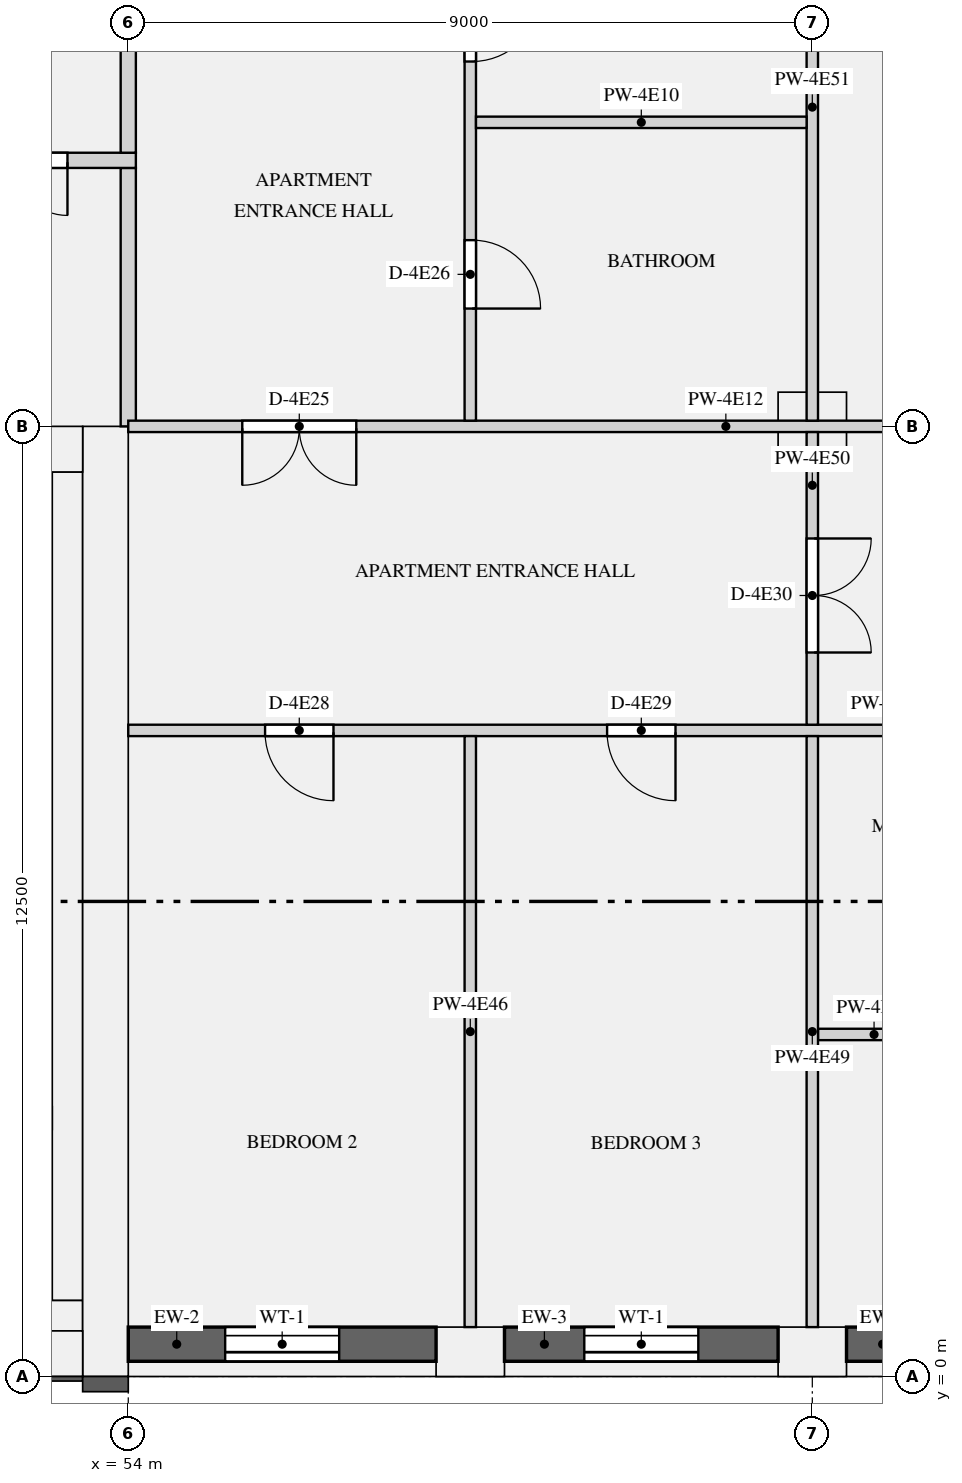
"""IFC4 building model, lengths in metres.
Left out: names, types, materials, properties, quantities, classifications, styles, units other than length and angle.
Written with IfcOpenShell. Run it as: python <this file> out.ifc"""

import sys

from ifc_helpers import new_model, si_unit, direction, frame, frame_2d, origin, origin_2d, place, context, subcontext, project, spatial, rectangle, extrude, element, fill, save


model = new_model("IFC4")
c1 = context("Model", 3, precision=1e-05, world=origin(), true_north=direction((0.0, 1.0)))
c2 = subcontext(c1, "Body", "Model", "MODEL_VIEW")
j1 = project(units=[si_unit("LENGTHUNIT", "METRE"), si_unit("PLANEANGLEUNIT", "RADIAN")], contexts=[c1])
p1 = place(None, origin())
s1 = spatial("IfcSite", under=j1, at=p1, CompositionType="ELEMENT")
p2 = place(p1, origin())
s2 = spatial("IfcBuilding", under=s1, at=p2, CompositionType="ELEMENT")
p3 = place(p2, frame((0.0, 0.0, 229.5)))
s3 = spatial("IfcBuildingStorey", under=s2, at=p3, CompositionType="ELEMENT", Elevation=229.5)
for number, where, z_axis, x_axis in (
    (1, (58.5, 0.325, 0.0), (0.0, 0.0, 1.0), (1.0, 0.0, 0.0)),
    (2, (63.0, 0.325, 0.0), (0.0, 0.0, 1.0), (1.0, 0.0, 0.0)),
):
    element("IfcColumn", number, at=place(p3, frame(where, z_axis=z_axis, x_axis=x_axis)), inside=s3, PredefinedType="USERDEFINED", context=c2, shape_type="SweptSolid", body=[
        extrude(rectangle(XDim=0.9, YDim=0.65, at=origin_2d()), origin(), (0.0, 0.0, 1.0), 3.15),
    ])
p4 = place(p3, frame((63.0, 12.5, 0.0), z_axis=(0.0, 0.0, 1.0), x_axis=(1.0, 0.0, 0.0)))
e3 = element("IfcColumn", 3, at=p4, inside=s3, PredefinedType="COLUMN", context=c2, shape_type="SweptSolid", body=[
    extrude(rectangle(XDim=0.9, YDim=0.9, at=origin_2d()), origin(), (0.0, 0.0, 1.0), 3.15),
])
p5 = place(p3, frame((53.7, 0.0, 0.0), z_axis=(0.0, 0.0, 1.0), x_axis=(0.0, 1.0, 0.0)))
e4 = element("IfcWall", 4, at=p5, inside=s3, PredefinedType="SHEAR", context=c2, shape_type="SweptSolid", body=[
    extrude(rectangle(XDim=12.5, YDim=0.6, at=frame_2d((6.25, 0.0))), origin(), (0.0, 0.0, 1.0), 3.15),
])
p6 = place(p3, frame((18.6, 0.3, 0.0), z_axis=(0.0, 0.0, 1.0), x_axis=(1.0, 0.0, 0.0)))
e5 = element("IfcWall", 5, at=p6, inside=s3, PredefinedType="SHEAR", context=c2, shape_type="SweptSolid", body=[
    extrude(rectangle(XDim=34.8, YDim=0.6, at=frame_2d((17.4, 0.0))), origin(), (0.0, 0.0, 1.0), 3.15),
])
p7 = place(p3, frame((18.6, 12.2, 0.0), z_axis=(0.0, 0.0, 1.0), x_axis=(1.0, 0.0, 0.0)))
e6 = element("IfcWall", 6, at=p7, inside=s3, PredefinedType="SHEAR", context=c2, shape_type="SweptSolid", body=[
    extrude(rectangle(XDim=34.8, YDim=0.6, at=frame_2d((17.4, 0.0))), origin(), (0.0, 0.0, 1.0), 3.15),
])
p8 = place(p7, frame((24.575, 0.0, 0.0)))
e7 = element("IfcOpeningElement", 7, at=p8, cuts=e6, PredefinedType="OPENING", context=c2, shape_type="SweptSolid", body=[
    extrude(rectangle(XDim=1.1, YDim=2.1, at=frame_2d((0.55, 1.05))), frame((0.0, 0.31, 0.0), z_axis=(0.0, -1.0, 0.0), x_axis=(1.0, 0.0, 0.0)), (0.0, 0.0, 1.0), 0.62),
])
p9 = place(p7, frame((26.825, 0.0, 0.0)))
e8 = element("IfcOpeningElement", 8, at=p9, cuts=e6, PredefinedType="OPENING", context=c2, shape_type="SweptSolid", body=[
    extrude(rectangle(XDim=1.1, YDim=2.1, at=frame_2d((0.55, 1.05))), frame((0.0, 0.31, 0.0), z_axis=(0.0, -1.0, 0.0), x_axis=(1.0, 0.0, 0.0)), (0.0, 0.0, 1.0), 0.62),
])
p10 = place(p7, frame((29.075, 0.0, 0.0)))
e9 = element("IfcOpeningElement", 9, at=p10, cuts=e6, PredefinedType="OPENING", context=c2, shape_type="SweptSolid", body=[
    extrude(rectangle(XDim=1.1, YDim=2.1, at=frame_2d((0.55, 1.05))), frame((0.0, 0.31, 0.0), z_axis=(0.0, -1.0, 0.0), x_axis=(1.0, 0.0, 0.0)), (0.0, 0.0, 1.0), 0.62),
])
p11 = place(p7, frame((4.95, 0.0, 0.0)))
e10 = element("IfcOpeningElement", 10, at=p11, cuts=e6, PredefinedType="OPENING", context=c2, shape_type="SweptSolid", body=[
    extrude(rectangle(XDim=0.9, YDim=2.1, at=frame_2d((0.45, 1.05))), frame((0.0, 0.31, 0.0), z_axis=(0.0, -1.0, 0.0), x_axis=(1.0, 0.0, 0.0)), (0.0, 0.0, 1.0), 0.62),
])
p12 = place(p7, frame((11.95, 0.0, 0.0)))
e11 = element("IfcOpeningElement", 11, at=p12, cuts=e6, PredefinedType="OPENING", context=c2, shape_type="SweptSolid", body=[
    extrude(rectangle(XDim=0.9, YDim=2.1, at=frame_2d((0.45, 1.05))), frame((0.0, 0.31, 0.0), z_axis=(0.0, -1.0, 0.0), x_axis=(1.0, 0.0, 0.0)), (0.0, 0.0, 1.0), 0.62),
])
p13 = place(p7, frame((18.45, 0.0, 0.0)))
e12 = element("IfcOpeningElement", 12, at=p13, cuts=e6, PredefinedType="OPENING", context=c2, shape_type="SweptSolid", body=[
    extrude(rectangle(XDim=0.9, YDim=2.1, at=frame_2d((0.45, 1.05))), frame((0.0, 0.31, 0.0), z_axis=(0.0, -1.0, 0.0), x_axis=(1.0, 0.0, 0.0)), (0.0, 0.0, 1.0), 0.62),
])
p14 = place(p7, frame((1.55, 0.0, 0.0)))
e13 = element("IfcOpeningElement", 13, at=p14, cuts=e6, PredefinedType="OPENING", context=c2, shape_type="SweptSolid", body=[
    extrude(rectangle(XDim=1.2, YDim=2.1, at=frame_2d((0.6, 1.05))), frame((0.0, 0.31, 0.0), z_axis=(0.0, -1.0, 0.0), x_axis=(1.0, 0.0, 0.0)), (0.0, 0.0, 1.0), 0.62),
])
p15 = place(p7, frame((32.05, 0.0, 0.0)))
e14 = element("IfcOpeningElement", 14, at=p15, cuts=e6, PredefinedType="OPENING", context=c2, shape_type="SweptSolid", body=[
    extrude(rectangle(XDim=1.2, YDim=2.1, at=frame_2d((0.6, 1.05))), frame((0.0, 0.31, 0.0), z_axis=(0.0, -1.0, 0.0), x_axis=(1.0, 0.0, 0.0)), (0.0, 0.0, 1.0), 0.62),
])
p16 = place(p3, frame((53.2, 1.0, 0.0), z_axis=(0.0, 0.0, 1.0), x_axis=(0.0, 1.0, 0.0)))
e15 = element("IfcWall", 15, at=p16, inside=s3, PredefinedType="SHEAR", context=c2, shape_type="SweptSolid", body=[
    extrude(rectangle(XDim=10.9, YDim=0.4, at=frame_2d((5.45, 0.0))), origin(), (0.0, 0.0, 1.0), 3.15),
])
p17 = place(p3, frame((18.6, 0.8, 0.0), z_axis=(0.0, 0.0, 1.0), x_axis=(1.0, 0.0, 0.0)))
e16 = element("IfcWall", 16, at=p17, inside=s3, PredefinedType="SHEAR", context=c2, shape_type="SweptSolid", body=[
    extrude(rectangle(XDim=34.8, YDim=0.4, at=frame_2d((17.4, 0.0))), origin(), (0.0, 0.0, 1.0), 3.15),
])
p18 = place(p3, frame((54.0, 0.425, 0.9), z_axis=(0.0, 0.0, 1.0), x_axis=(1.0, 0.0, 0.0)))
e17 = element("IfcWall", 17, at=p18, inside=s3, PredefinedType="SOLIDWALL", context=c2, shape_type="SweptSolid", body=[
    extrude(rectangle(XDim=4.05, YDim=0.45, at=frame_2d((2.025, 0.0))), origin(), (0.0, 0.0, 1.0), 1.93),
])
p19 = place(p18, frame((1.275, 0.0, 0.15)))
e18 = element("IfcOpeningElement", 18, at=p19, cuts=e17, PredefinedType="OPENING", context=c2, shape_type="SweptSolid", body=[
    extrude(rectangle(XDim=1.5, YDim=1.5, at=frame_2d((0.75, 0.75))), frame((0.0, 0.235, 0.0), z_axis=(0.0, -1.0, 0.0), x_axis=(1.0, 0.0, 0.0)), (0.0, 0.0, 1.0), 0.47),
])
p20 = place(p3, frame((58.95, 0.425, 0.9), z_axis=(0.0, 0.0, 1.0), x_axis=(1.0, 0.0, 0.0)))
e19 = element("IfcWall", 19, at=p20, inside=s3, PredefinedType="SOLIDWALL", context=c2, shape_type="SweptSolid", body=[
    extrude(rectangle(XDim=3.6, YDim=0.45, at=frame_2d((1.8, 0.0))), origin(), (0.0, 0.0, 1.0), 1.93),
])
p21 = place(p20, frame((1.05, 0.0, 0.15)))
e20 = element("IfcOpeningElement", 20, at=p21, cuts=e19, PredefinedType="OPENING", context=c2, shape_type="SweptSolid", body=[
    extrude(rectangle(XDim=1.5, YDim=1.5, at=frame_2d((0.75, 0.75))), frame((0.0, 0.235, 0.0), z_axis=(0.0, -1.0, 0.0), x_axis=(1.0, 0.0, 0.0)), (0.0, 0.0, 1.0), 0.47),
])
p22 = place(p3, frame((63.45, 0.425, 0.9), z_axis=(0.0, 0.0, 1.0), x_axis=(1.0, 0.0, 0.0)))
e21 = element("IfcWall", 21, at=p22, inside=s3, PredefinedType="SOLIDWALL", context=c2, shape_type="SweptSolid", body=[
    extrude(rectangle(XDim=3.4, YDim=0.45, at=frame_2d((1.7, 0.0))), origin(), (0.0, 0.0, 1.0), 1.93),
])
p23 = place(p22, frame((0.95, 0.0, 0.15)))
e22 = element("IfcOpeningElement", 22, at=p23, cuts=e21, PredefinedType="OPENING", context=c2, shape_type="SweptSolid", body=[
    extrude(rectangle(XDim=1.5, YDim=1.5, at=frame_2d((0.75, 0.75))), frame((0.0, 0.235, 0.0), z_axis=(0.0, -1.0, 0.0), x_axis=(1.0, 0.0, 0.0)), (0.0, 0.0, 1.0), 0.47),
])
p24 = place(p3, frame((54.0, 12.5, 0.0), z_axis=(0.0, 0.0, 1.0), x_axis=(0.0, 1.0, 0.0)))
e23 = element("IfcWall", 23, at=p24, inside=s3, PredefinedType="PARTITIONING", context=c2, shape_type="SweptSolid", body=[
    extrude(rectangle(XDim=3.4, YDim=0.2, at=frame_2d((1.7, 0.0))), origin(), (0.0, 0.0, 1.0), 2.83),
])
p25 = place(p3, frame((58.575, 16.5, 0.0), z_axis=(0.0, 0.0, 1.0), x_axis=(1.0, 0.0, 0.0)))
e24 = element("IfcWall", 24, at=p25, inside=s3, PredefinedType="PARTITIONING", context=c2, shape_type="SweptSolid", body=[
    extrude(rectangle(XDim=4.35, YDim=0.15, at=frame_2d((2.175, 0.0))), origin(), (0.0, 0.0, 1.0), 2.83),
])
p26 = place(p3, frame((54.0, 12.5, 0.0), z_axis=(0.0, 0.0, 1.0), x_axis=(1.0, 0.0, 0.0)))
e25 = element("IfcWall", 25, at=p26, inside=s3, PredefinedType="PARTITIONING", context=c2, shape_type="SweptSolid", body=[
    extrude(rectangle(XDim=17.35, YDim=0.15, at=frame_2d((8.675, 0.0))), origin(), (0.0, 0.0, 1.0), 2.83),
])
p27 = place(p26, frame((1.5, 0.0, 0.0)))
e26 = element("IfcOpeningElement", 26, at=p27, cuts=e25, PredefinedType="OPENING", context=c2, shape_type="SweptSolid", body=[
    extrude(rectangle(XDim=1.5, YDim=2.1, at=frame_2d((0.75, 1.05))), frame((0.0, 0.085, 0.0), z_axis=(0.0, -1.0, 0.0), x_axis=(1.0, 0.0, 0.0)), (0.0, 0.0, 1.0), 0.17),
])
p28 = place(p26, frame((12.725, 0.0, 0.0)))
e27 = element("IfcOpeningElement", 27, at=p28, cuts=e25, PredefinedType="OPENING", context=c2, shape_type="SweptSolid", body=[
    extrude(rectangle(XDim=1.5, YDim=2.1, at=frame_2d((0.75, 1.05))), frame((0.0, 0.085, 0.0), z_axis=(0.0, -1.0, 0.0), x_axis=(1.0, 0.0, 0.0)), (0.0, 0.0, 1.0), 0.17),
])
p29 = place(p3, frame((54.0, 8.5, 0.0), z_axis=(0.0, 0.0, 1.0), x_axis=(1.0, 0.0, 0.0)))
e28 = element("IfcWall", 28, at=p29, inside=s3, PredefinedType="PARTITIONING", context=c2, shape_type="SweptSolid", body=[
    extrude(rectangle(XDim=17.35, YDim=0.15, at=frame_2d((8.675, 0.0))), origin(), (0.0, 0.0, 1.0), 2.83),
])
p30 = place(p29, frame((1.8, 0.0, 0.0)))
e29 = element("IfcOpeningElement", 29, at=p30, cuts=e28, PredefinedType="OPENING", context=c2, shape_type="SweptSolid", body=[
    extrude(rectangle(XDim=0.9, YDim=2.1, at=frame_2d((0.45, 1.05))), frame((0.0, 0.085, 0.0), z_axis=(0.0, -1.0, 0.0), x_axis=(1.0, 0.0, 0.0)), (0.0, 0.0, 1.0), 0.17),
])
p31 = place(p29, frame((6.3, 0.0, 0.0)))
e30 = element("IfcOpeningElement", 30, at=p31, cuts=e28, PredefinedType="OPENING", context=c2, shape_type="SweptSolid", body=[
    extrude(rectangle(XDim=0.9, YDim=2.1, at=frame_2d((0.45, 1.05))), frame((0.0, 0.085, 0.0), z_axis=(0.0, -1.0, 0.0), x_axis=(1.0, 0.0, 0.0)), (0.0, 0.0, 1.0), 0.17),
])
p32 = place(p29, frame((12.8, 0.0, 0.0)))
e31 = element("IfcOpeningElement", 31, at=p32, cuts=e28, PredefinedType="OPENING", context=c2, shape_type="SweptSolid", body=[
    extrude(rectangle(XDim=0.9, YDim=2.1, at=frame_2d((0.45, 1.05))), frame((0.0, 0.085, 0.0), z_axis=(0.0, -1.0, 0.0), x_axis=(1.0, 0.0, 0.0)), (0.0, 0.0, 1.0), 0.17),
])
p33 = place(p3, frame((63.075, 4.5, 0.0), z_axis=(0.0, 0.0, 1.0), x_axis=(1.0, 0.0, 0.0)))
e32 = element("IfcWall", 32, at=p33, inside=s3, PredefinedType="PARTITIONING", context=c2, shape_type="SweptSolid", body=[
    extrude(rectangle(XDim=3.775, YDim=0.15, at=frame_2d((1.888, 0.0))), origin(), (0.0, 0.0, 1.0), 2.83),
])
p34 = place(p33, frame((1.475, 0.0, 0.0)))
e33 = element("IfcOpeningElement", 33, at=p34, cuts=e32, PredefinedType="OPENING", context=c2, shape_type="SweptSolid", body=[
    extrude(rectangle(XDim=0.9, YDim=2.1, at=frame_2d((0.45, 1.05))), frame((0.0, 0.085, 0.0), z_axis=(0.0, -1.0, 0.0), x_axis=(1.0, 0.0, 0.0)), (0.0, 0.0, 1.0), 0.17),
])
p35 = place(p3, frame((17.9, 16.0, 0.0), z_axis=(0.0, 0.0, 1.0), x_axis=(1.0, 0.0, 0.0)))
e34 = element("IfcWall", 34, at=p35, inside=s3, PredefinedType="PARTITIONING", context=c2, shape_type="SweptSolid", body=[
    extrude(rectangle(XDim=36.2, YDim=0.2, at=frame_2d((18.1, 0.0))), origin(), (0.0, 0.0, 1.0), 2.83),
])
p36 = place(p35, frame((0.9, 0.0, 0.0)))
e35 = element("IfcOpeningElement", 35, at=p36, cuts=e34, PredefinedType="OPENING", context=c2, shape_type="SweptSolid", body=[
    extrude(rectangle(XDim=1.4, YDim=2.1, at=frame_2d((0.7, 1.05))), frame((0.0, 0.11, 0.0), z_axis=(0.0, -1.0, 0.0), x_axis=(1.0, 0.0, 0.0)), (0.0, 0.0, 1.0), 0.22),
])
p37 = place(p35, frame((33.9, 0.0, 0.0)))
e36 = element("IfcOpeningElement", 36, at=p37, cuts=e34, PredefinedType="OPENING", context=c2, shape_type="SweptSolid", body=[
    extrude(rectangle(XDim=1.4, YDim=2.1, at=frame_2d((0.7, 1.05))), frame((0.0, 0.11, 0.0), z_axis=(0.0, -1.0, 0.0), x_axis=(1.0, 0.0, 0.0)), (0.0, 0.0, 1.0), 0.22),
])
p38 = place(p3, frame((54.0, 16.1, 0.0), z_axis=(0.0, 0.0, 1.0), x_axis=(0.0, 1.0, 0.0)))
e37 = element("IfcWall", 37, at=p38, inside=s3, PredefinedType="PARTITIONING", context=c2, shape_type="SweptSolid", body=[
    extrude(rectangle(XDim=7.8, YDim=0.2, at=frame_2d((3.9, 0.0))), origin(), (0.0, 0.0, 1.0), 2.83),
])
p39 = place(p38, frame((1.85, 0.0, 0.0)))
e38 = element("IfcOpeningElement", 38, at=p39, cuts=e37, PredefinedType="OPENING", context=c2, shape_type="SweptSolid", body=[
    extrude(rectangle(XDim=1.1, YDim=2.1, at=frame_2d((0.55, 1.05))), frame((0.0, 0.11, 0.0), z_axis=(0.0, -1.0, 0.0), x_axis=(1.0, 0.0, 0.0)), (0.0, 0.0, 1.0), 0.22),
])
p40 = place(p3, frame((58.5, 0.65, 0.0), z_axis=(0.0, 0.0, 1.0), x_axis=(0.0, 1.0, 0.0)))
e39 = element("IfcWall", 39, at=p40, inside=s3, PredefinedType="PARTITIONING", context=c2, shape_type="SweptSolid", body=[
    extrude(rectangle(XDim=7.775, YDim=0.15, at=frame_2d((3.888, 0.0))), origin(), (0.0, 0.0, 1.0), 2.83),
])
p41 = place(p3, frame((58.5, 12.575, 0.0), z_axis=(0.0, 0.0, 1.0), x_axis=(0.0, 1.0, 0.0)))
e40 = element("IfcWall", 40, at=p41, inside=s3, PredefinedType="PARTITIONING", context=c2, shape_type="SweptSolid", body=[
    extrude(rectangle(XDim=10.325, YDim=0.15, at=frame_2d((5.163, 0.0))), origin(), (0.0, 0.0, 1.0), 2.83),
])
p42 = place(p41, frame((1.475, 0.0, 0.0)))
e41 = element("IfcOpeningElement", 41, at=p42, cuts=e40, PredefinedType="OPENING", context=c2, shape_type="SweptSolid", body=[
    extrude(rectangle(XDim=0.9, YDim=2.1, at=frame_2d((0.45, 1.05))), frame((0.0, 0.085, 0.0), z_axis=(0.0, -1.0, 0.0), x_axis=(1.0, 0.0, 0.0)), (0.0, 0.0, 1.0), 0.17),
])
p43 = place(p41, frame((4.725, 0.0, 0.0)))
e42 = element("IfcOpeningElement", 42, at=p43, cuts=e40, PredefinedType="OPENING", context=c2, shape_type="SweptSolid", body=[
    extrude(rectangle(XDim=0.9, YDim=2.1, at=frame_2d((0.45, 1.05))), frame((0.0, 0.085, 0.0), z_axis=(0.0, -1.0, 0.0), x_axis=(1.0, 0.0, 0.0)), (0.0, 0.0, 1.0), 0.17),
])
p44 = place(p41, frame((8.0, 0.0, 0.0)))
e43 = element("IfcOpeningElement", 43, at=p44, cuts=e40, PredefinedType="OPENING", context=c2, shape_type="SweptSolid", body=[
    extrude(rectangle(XDim=0.9, YDim=2.1, at=frame_2d((0.45, 1.05))), frame((0.0, 0.085, 0.0), z_axis=(0.0, -1.0, 0.0), x_axis=(1.0, 0.0, 0.0)), (0.0, 0.0, 1.0), 0.17),
])
p45 = place(p3, frame((63.0, 0.65, 0.0), z_axis=(0.0, 0.0, 1.0), x_axis=(0.0, 1.0, 0.0)))
e44 = element("IfcWall", 44, at=p45, inside=s3, PredefinedType="PARTITIONING", context=c2, shape_type="SweptSolid", body=[
    extrude(rectangle(XDim=7.775, YDim=0.15, at=frame_2d((3.888, 0.0))), origin(), (0.0, 0.0, 1.0), 2.83),
])
p46 = place(p3, frame((63.0, 8.575, 0.0), z_axis=(0.0, 0.0, 1.0), x_axis=(0.0, 1.0, 0.0)))
e45 = element("IfcWall", 45, at=p46, inside=s3, PredefinedType="PARTITIONING", context=c2, shape_type="SweptSolid", body=[
    extrude(rectangle(XDim=3.85, YDim=0.15, at=frame_2d((1.925, 0.0))), origin(), (0.0, 0.0, 1.0), 2.83),
])
p47 = place(p46, frame((0.95, 0.0, 0.0)))
e46 = element("IfcOpeningElement", 46, at=p47, cuts=e45, PredefinedType="OPENING", context=c2, shape_type="SweptSolid", body=[
    extrude(rectangle(XDim=1.5, YDim=2.1, at=frame_2d((0.75, 1.05))), frame((0.0, 0.085, 0.0), z_axis=(0.0, -1.0, 0.0), x_axis=(1.0, 0.0, 0.0)), (0.0, 0.0, 1.0), 0.17),
])
p48 = place(p3, frame((63.0, 12.575, 0.0), z_axis=(0.0, 0.0, 1.0), x_axis=(0.0, 1.0, 0.0)))
e47 = element("IfcWall", 47, at=p48, inside=s3, PredefinedType="PARTITIONING", context=c2, shape_type="SweptSolid", body=[
    extrude(rectangle(XDim=11.85, YDim=0.15, at=frame_2d((5.925, 0.0))), origin(), (0.0, 0.0, 1.0), 2.83),
])
p49 = place(p48, frame((8.25, 0.0, 0.0)))
e48 = element("IfcOpeningElement", 48, at=p49, cuts=e47, PredefinedType="OPENING", context=c2, shape_type="SweptSolid", body=[
    extrude(rectangle(XDim=0.9, YDim=2.1, at=frame_2d((0.45, 1.05))), frame((0.0, 0.085, 0.0), z_axis=(0.0, -1.0, 0.0), x_axis=(1.0, 0.0, 0.0)), (0.0, 0.0, 1.0), 0.17),
])
p50 = place(p19, origin())
e49 = element("IfcWindow", 49, at=p50, inside=s3, PartitioningType="SINGLE_PANEL", PredefinedType="WINDOW", context=c2, shape_type="SweptSolid", body=[
    extrude(rectangle(XDim=1.5, YDim=1.5, at=frame_2d((0.75, 0.75))), frame((0.0, -0.065, 0.0), z_axis=(0.0, -1.0, 0.0), x_axis=(1.0, 0.0, 0.0)), (0.0, 0.0, 1.0), 0.06),
])
fill(e18, e49)
p51 = place(p21, origin())
e50 = element("IfcWindow", 50, at=p51, inside=s3, PartitioningType="SINGLE_PANEL", PredefinedType="WINDOW", context=c2, shape_type="SweptSolid", body=[
    extrude(rectangle(XDim=1.5, YDim=1.5, at=frame_2d((0.75, 0.75))), frame((0.0, -0.065, 0.0), z_axis=(0.0, -1.0, 0.0), x_axis=(1.0, 0.0, 0.0)), (0.0, 0.0, 1.0), 0.06),
])
fill(e20, e50)
p52 = place(p37, frame((1.4, 0.0, 0.0), z_axis=(0.0, 0.0, 1.0), x_axis=(-1.0, 0.0, 0.0)))
e51 = element("IfcDoor", 51, at=p52, inside=s3, OperationType="DOUBLE_DOOR_SINGLE_SWING", PredefinedType="DOOR", context=c2, shape_type="SweptSolid", body=[
    extrude(rectangle(XDim=1.4, YDim=2.1, at=frame_2d((0.7, 1.05))), frame((0.0, 0.025, 0.0), z_axis=(0.0, -1.0, 0.0), x_axis=(1.0, 0.0, 0.0)), (0.0, 0.0, 1.0), 0.05),
])
fill(e36, e51)
p53 = place(p27, frame((1.5, 0.0, 0.0), z_axis=(0.0, 0.0, 1.0), x_axis=(-1.0, 0.0, 0.0)))
e52 = element("IfcDoor", 52, at=p53, inside=s3, OperationType="DOUBLE_DOOR_SINGLE_SWING", PredefinedType="DOOR", context=c2, shape_type="SweptSolid", body=[
    extrude(rectangle(XDim=1.5, YDim=2.1, at=frame_2d((0.75, 1.05))), frame((0.0, 0.025, 0.0), z_axis=(0.0, -1.0, 0.0), x_axis=(1.0, 0.0, 0.0)), (0.0, 0.0, 1.0), 0.05),
])
fill(e26, e52)
p54 = place(p42, frame((0.9, 0.0, 0.0), z_axis=(0.0, 0.0, 1.0), x_axis=(-1.0, 0.0, 0.0)))
e53 = element("IfcDoor", 53, at=p54, inside=s3, OperationType="SINGLE_SWING_RIGHT", PredefinedType="DOOR", context=c2, shape_type="SweptSolid", body=[
    extrude(rectangle(XDim=0.9, YDim=2.1, at=frame_2d((0.45, 1.05))), frame((0.0, 0.025, 0.0), z_axis=(0.0, -1.0, 0.0), x_axis=(1.0, 0.0, 0.0)), (0.0, 0.0, 1.0), 0.05),
])
fill(e41, e53)
p55 = place(p43, frame((0.9, 0.0, 0.0), z_axis=(0.0, 0.0, 1.0), x_axis=(-1.0, 0.0, 0.0)))
e54 = element("IfcDoor", 54, at=p55, inside=s3, OperationType="SINGLE_SWING_LEFT", PredefinedType="DOOR", context=c2, shape_type="SweptSolid", body=[
    extrude(rectangle(XDim=0.9, YDim=2.1, at=frame_2d((0.45, 1.05))), frame((0.0, 0.025, 0.0), z_axis=(0.0, -1.0, 0.0), x_axis=(1.0, 0.0, 0.0)), (0.0, 0.0, 1.0), 0.05),
])
fill(e42, e54)
p56 = place(p30, frame((0.9, 0.0, 0.0), z_axis=(0.0, 0.0, 1.0), x_axis=(-1.0, 0.0, 0.0)))
e55 = element("IfcDoor", 55, at=p56, inside=s3, OperationType="SINGLE_SWING_LEFT", PredefinedType="DOOR", context=c2, shape_type="SweptSolid", body=[
    extrude(rectangle(XDim=0.9, YDim=2.1, at=frame_2d((0.45, 1.05))), frame((0.0, 0.025, 0.0), z_axis=(0.0, -1.0, 0.0), x_axis=(1.0, 0.0, 0.0)), (0.0, 0.0, 1.0), 0.05),
])
fill(e29, e55)
p57 = place(p31, frame((0.9, 0.0, 0.0), z_axis=(0.0, 0.0, 1.0), x_axis=(-1.0, 0.0, 0.0)))
e56 = element("IfcDoor", 56, at=p57, inside=s3, OperationType="SINGLE_SWING_LEFT", PredefinedType="DOOR", context=c2, shape_type="SweptSolid", body=[
    extrude(rectangle(XDim=0.9, YDim=2.1, at=frame_2d((0.45, 1.05))), frame((0.0, 0.025, 0.0), z_axis=(0.0, -1.0, 0.0), x_axis=(1.0, 0.0, 0.0)), (0.0, 0.0, 1.0), 0.05),
])
fill(e30, e56)
p58 = place(p47, frame((1.5, 0.0, 0.0), z_axis=(0.0, 0.0, 1.0), x_axis=(-1.0, 0.0, 0.0)))
e57 = element("IfcDoor", 57, at=p58, inside=s3, OperationType="DOUBLE_DOOR_SINGLE_SWING", PredefinedType="DOOR", context=c2, shape_type="SweptSolid", body=[
    extrude(rectangle(XDim=1.5, YDim=2.1, at=frame_2d((0.75, 1.05))), frame((0.0, 0.025, 0.0), z_axis=(0.0, -1.0, 0.0), x_axis=(1.0, 0.0, 0.0)), (0.0, 0.0, 1.0), 0.05),
])
fill(e46, e57)
save(model, sys.argv[1])
